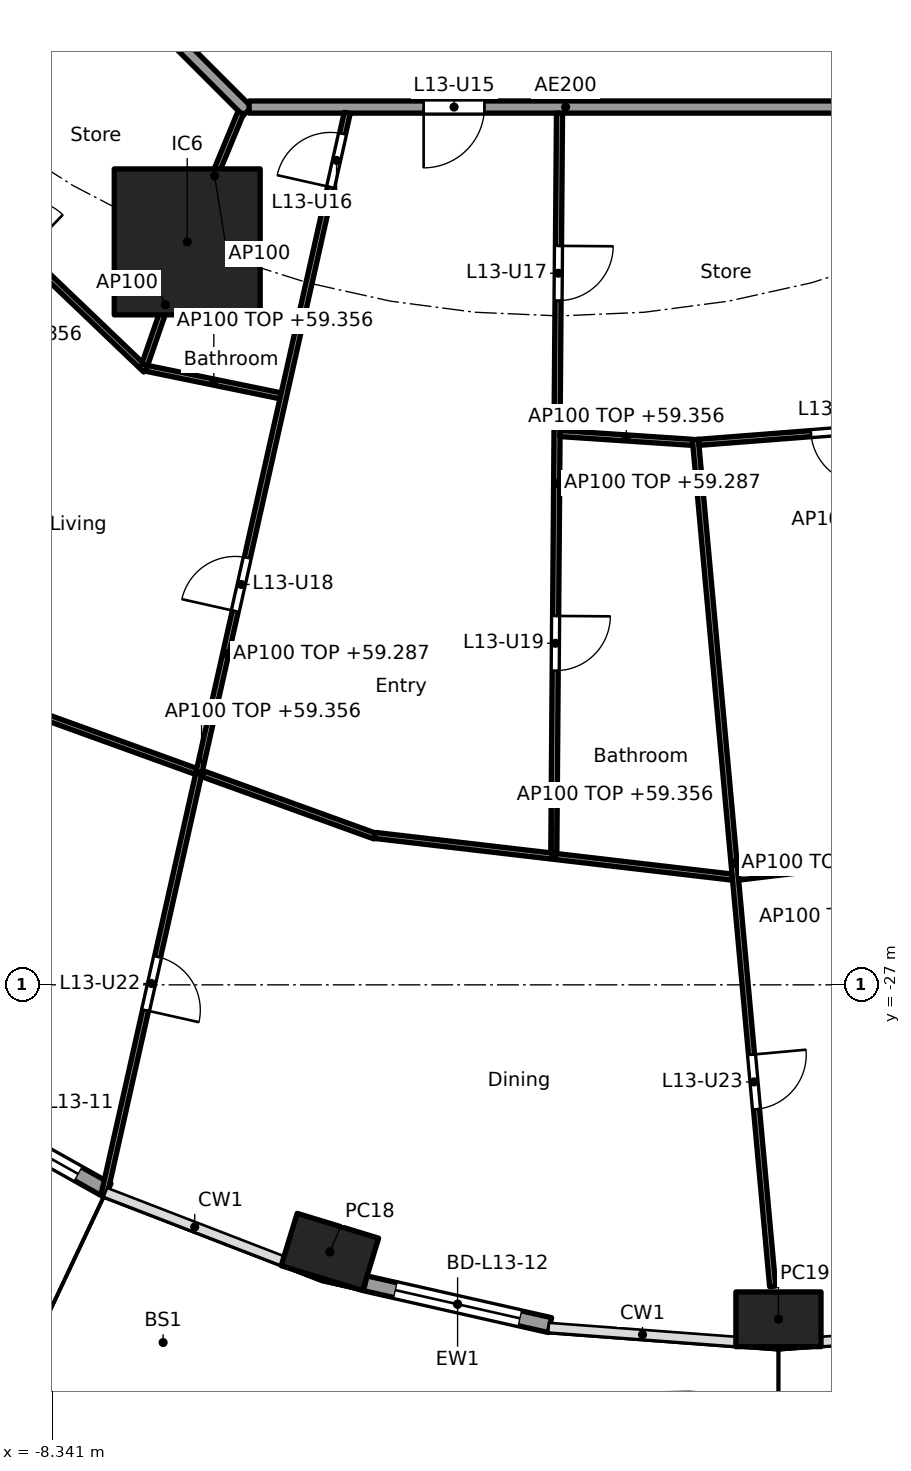
"""IFC4 building model, lengths in metres.
Left out: names, types, materials, properties, quantities, classifications, styles, units other than length and angle.
Written with IfcOpenShell. Run it as: python <this file> out.ifc"""

import sys

from ifc_helpers import new_model, si_unit, direction, frame, frame_2d, origin, origin_2d, place, context, subcontext, project, spatial, rectangle, hollow_rectangle, extrude, element, fill, save


model = new_model("IFC4")
c1 = context("Model", 3, precision=1e-05, world=origin(), true_north=direction((0.0, 1.0)))
c2 = subcontext(c1, "Body", "Model", "MODEL_VIEW")
j1 = project(units=[si_unit("LENGTHUNIT", "METRE"), si_unit("PLANEANGLEUNIT", "RADIAN")], contexts=[c1])
p1 = place(None, origin())
s1 = spatial("IfcSite", under=j1, at=p1, CompositionType="ELEMENT")
p2 = place(p1, origin())
s2 = spatial("IfcBuilding", under=s1, at=p2, CompositionType="ELEMENT")
p3 = place(p2, frame((0.0, 0.0, 56.6)))
s3 = spatial("IfcBuildingStorey", under=s2, at=p3, CompositionType="ELEMENT", Elevation=56.6)
for number, where, z_axis, x_axis in (
    (1, (-3.776, -31.393, 0.0), (0.0, 0.0, 1.0), (0.957, -0.292, 0.0)),
    (2, (3.6, -32.5, 0.0), (0.0, 0.0, 1.0), (1.0, 0.0, 0.0)),
):
    element("IfcColumn", number, at=place(p3, frame(where, z_axis=z_axis, x_axis=x_axis)), inside=s3, PredefinedType="COLUMN", context=c2, shape_type="SweptSolid", body=[
        extrude(hollow_rectangle(XDim=1.4, YDim=0.9, WallThickness=0.05, at=origin_2d()), origin(), (0.0, 0.0, 1.0), 3.7),
    ])
p4 = place(p3, frame((-6.123, -14.782, 0.0), z_axis=(0.0, 0.0, 1.0), x_axis=(1.0, 0.0, 0.0)))
e3 = element("IfcColumn", 3, at=p4, inside=s3, PredefinedType="COLUMN", context=c2, shape_type="SweptSolid", body=[
    extrude(rectangle(XDim=2.4, YDim=2.4, at=origin_2d()), origin(), (0.0, 0.0, 1.0), 3.7),
])
p5 = place(p3, frame((-7.437, -30.379, 0.0), z_axis=(0.0, 0.0, 1.0), x_axis=(-0.872084295691, 0.489355679653, 0.0)))
e4 = element("IfcWall", 4, at=p5, inside=s3, PredefinedType="SOLIDWALL", context=c2, shape_type="SweptSolid", body=[
    extrude(rectangle(XDim=3.201, YDim=0.25, at=frame_2d((1.601, 0.0))), origin(), (0.0, 0.0, 1.0), 3.44),
])
p6 = place(p5, frame((0.551, 0.0, 0.0)))
e5 = element("IfcOpeningElement", 5, at=p6, cuts=e4, PredefinedType="OPENING", context=c2, shape_type="SweptSolid", body=[
    extrude(rectangle(XDim=2.1, YDim=2.4, at=frame_2d((1.05, 1.2))), frame((0.0, 0.135, 0.0), z_axis=(0.0, -1.0, 0.0), x_axis=(1.0, 0.0, 0.0)), (0.0, 0.0, 1.0), 0.27),
])
p7 = place(p3, frame((-0.158, -32.596, 0.0), z_axis=(0.0, 0.0, 1.0), x_axis=(-0.975331134677, 0.220746863466, 0.0)))
e6 = element("IfcWall", 6, at=p7, inside=s3, PredefinedType="SOLIDWALL", context=c2, shape_type="SweptSolid", body=[
    extrude(rectangle(XDim=3.115, YDim=0.25, at=frame_2d((1.557, 0.0))), origin(), (0.0, 0.0, 1.0), 3.44),
])
p8 = place(p7, frame((0.507, 0.0, 0.0)))
e7 = element("IfcOpeningElement", 7, at=p8, cuts=e6, PredefinedType="OPENING", context=c2, shape_type="SweptSolid", body=[
    extrude(rectangle(XDim=2.1, YDim=2.4, at=frame_2d((1.05, 1.2))), frame((0.0, 0.135, 0.0), z_axis=(0.0, -1.0, 0.0), x_axis=(1.0, 0.0, 0.0)), (0.0, 0.0, 1.0), 0.27),
])
p9 = place(p3, frame((-12.635, -5.134, 0.0), z_axis=(0.0, 0.0, 1.0), x_axis=(0.707106781187, -0.707106781187, 0.0)))
e8 = element("IfcWall", 8, at=p9, inside=s3, PredefinedType="PARTITIONING", context=c2, shape_type="SweptSolid", body=[
    extrude(rectangle(XDim=10.609, YDim=0.2, at=frame_2d((5.305, 0.0))), origin(), (0.0, 0.0, 1.0), 3.44),
])
p10 = place(p3, frame((-5.104, -12.565, 0.0), z_axis=(0.0, 0.0, 1.0), x_axis=(1.0, 0.0, 0.0)))
e9 = element("IfcWall", 9, at=p10, inside=s3, PredefinedType="PARTITIONING", context=c2, shape_type="SweptSolid", body=[
    extrude(rectangle(XDim=10.409, YDim=0.2, at=frame_2d((5.205, 0.0))), origin(), (0.0, 0.0, 1.0), 3.44),
])
p11 = place(p10, frame((2.87, 0.0, 0.0)))
e10 = element("IfcOpeningElement", 10, at=p11, cuts=e9, PredefinedType="OPENING", context=c2, shape_type="SweptSolid", body=[
    extrude(rectangle(XDim=1.0, YDim=2.1, at=frame_2d((0.5, 1.05))), frame((0.0, 0.11, 0.0), z_axis=(0.0, -1.0, 0.0), x_axis=(1.0, 0.0, 0.0)), (0.0, 0.0, 1.0), 0.22),
])
p12 = place(p3, frame((-7.715, -10.193, 0.0), z_axis=(0.0, 0.0, 1.0), x_axis=(-0.573126502256, -0.819466907454, 0.0)))
e11 = element("IfcWall", 11, at=p12, inside=s3, PredefinedType="PARTITIONING", context=c2, shape_type="SweptSolid", body=[
    extrude(rectangle(XDim=9.954, YDim=0.1, at=frame_2d((4.977, 0.0))), origin(), (0.0, 0.0, 1.0), 2.687),
])
p13 = place(p3, frame((-10.119, -13.716, 0.0), z_axis=(0.0, 0.0, 1.0), x_axis=(0.722763212502, -0.69109575216, 0.0)))
e12 = element("IfcWall", 12, at=p13, inside=s3, PredefinedType="PARTITIONING", context=c2, shape_type="SweptSolid", body=[
    extrude(rectangle(XDim=4.587, YDim=0.1, at=frame_2d((2.293, 0.0))), origin(), (0.0, 0.0, 1.0), 2.756),
])
p14 = place(p13, frame((0.938, 0.0, 0.0)))
e13 = element("IfcOpeningElement", 13, at=p14, cuts=e12, PredefinedType="OPENING", context=c2, shape_type="SweptSolid", body=[
    extrude(rectangle(XDim=0.9, YDim=2.1, at=frame_2d((0.45, 1.05))), frame((0.0, 0.06, 0.0), z_axis=(0.0, -1.0, 0.0), x_axis=(1.0, 0.0, 0.0)), (0.0, 0.0, 1.0), 0.12),
])
p15 = place(p3, frame((-5.243, -12.657, 0.0), z_axis=(0.0, 0.0, 1.0), x_axis=(-0.382719158442, -0.923864733477, 0.0)))
e14 = element("IfcWall", 14, at=p15, inside=s3, PredefinedType="PARTITIONING", context=c2, shape_type="SweptSolid", body=[
    extrude(rectangle(XDim=2.25, YDim=0.1, at=frame_2d((1.125, 0.0))), origin(), (0.0, 0.0, 1.0), 3.44),
])
p16 = place(p3, frame((-6.139, -14.83, 0.0), z_axis=(0.0, 0.0, 1.0), x_axis=(-0.327246993321, -0.944938836837, 0.0)))
e15 = element("IfcWall", 15, at=p16, inside=s3, PredefinedType="PARTITIONING", context=c2, shape_type="SweptSolid", body=[
    extrude(rectangle(XDim=2.09, YDim=0.1, at=frame_2d((1.045, 0.0))), origin(), (0.0, 0.0, 1.0), 3.44),
])
p17 = place(p3, frame((-6.791, -16.862, 0.0), z_axis=(0.0, 0.0, 1.0), x_axis=(0.979581941859, -0.201045316246, 0.0)))
e16 = element("IfcWall", 16, at=p17, inside=s3, PredefinedType="PARTITIONING", context=c2, shape_type="SweptSolid", body=[
    extrude(rectangle(XDim=2.256, YDim=0.1, at=frame_2d((1.128, 0.0))), origin(), (0.0, 0.0, 1.0), 2.756),
])
p18 = place(p3, frame((-8.739, -22.491, 0.0), z_axis=(0.0, 0.0, 1.0), x_axis=(0.940401691072, -0.340065669288, 0.0)))
e17 = element("IfcWall", 17, at=p18, inside=s3, PredefinedType="PARTITIONING", context=c2, shape_type="SweptSolid", body=[
    extrude(rectangle(XDim=6.067, YDim=0.1, at=frame_2d((3.034, 0.0))), origin(), (0.0, 0.0, 1.0), 2.756),
])
p19 = place(p3, frame((-3.492, -12.662, 0.0), z_axis=(0.0, 0.0, 1.0), x_axis=(-0.219268088006, -0.975664648115, 0.0)))
e18 = element("IfcWall", 18, at=p19, inside=s3, PredefinedType="PARTITIONING", context=c2, shape_type="SweptSolid", body=[
    extrude(rectangle(XDim=18.23, YDim=0.1, at=frame_2d((9.115, 0.0))), origin(), (0.0, 0.0, 1.0), 2.687),
])
p20 = place(p19, frame((0.35, 0.0, 0.0)))
e19 = element("IfcOpeningElement", 19, at=p20, cuts=e18, PredefinedType="OPENING", context=c2, shape_type="SweptSolid", body=[
    extrude(rectangle(XDim=0.9, YDim=2.1, at=frame_2d((0.45, 1.05))), frame((0.0, 0.06, 0.0), z_axis=(0.0, -1.0, 0.0), x_axis=(1.0, 0.0, 0.0)), (0.0, 0.0, 1.0), 0.12),
])
p21 = place(p19, frame((7.497, 0.0, 0.0)))
e20 = element("IfcOpeningElement", 20, at=p21, cuts=e18, PredefinedType="OPENING", context=c2, shape_type="SweptSolid", body=[
    extrude(rectangle(XDim=0.9, YDim=2.1, at=frame_2d((0.45, 1.05))), frame((0.0, 0.06, 0.0), z_axis=(0.0, -1.0, 0.0), x_axis=(1.0, 0.0, 0.0)), (0.0, 0.0, 1.0), 0.12),
])
p22 = place(p19, frame((14.223, 0.0, 0.0)))
e21 = element("IfcOpeningElement", 21, at=p22, cuts=e18, PredefinedType="OPENING", context=c2, shape_type="SweptSolid", body=[
    extrude(rectangle(XDim=0.9, YDim=2.1, at=frame_2d((0.45, 1.05))), frame((0.0, 0.06, 0.0), z_axis=(0.0, -1.0, 0.0), x_axis=(1.0, 0.0, 0.0)), (0.0, 0.0, 1.0), 0.12),
])
p23 = place(p3, frame((-3.031, -24.543, 0.0), z_axis=(0.0, 0.0, 1.0), x_axis=(0.993255612046, -0.115945198862, 0.0)))
e22 = element("IfcWall", 22, at=p23, inside=s3, PredefinedType="PARTITIONING", context=c2, shape_type="SweptSolid", body=[
    extrude(rectangle(XDim=5.913, YDim=0.1, at=frame_2d((2.956, 0.0))), origin(), (0.0, 0.0, 1.0), 2.756),
])
p24 = place(p3, frame((-0.001, -12.665, 0.0), z_axis=(0.0, 0.0, 1.0), x_axis=(-0.007702417287, -0.999970335944, 0.0)))
e23 = element("IfcWall", 23, at=p24, inside=s3, PredefinedType="PARTITIONING", context=c2, shape_type="SweptSolid", body=[
    extrude(rectangle(XDim=12.171, YDim=0.1, at=frame_2d((6.086, 0.0))), origin(), (0.0, 0.0, 1.0), 2.687),
])
p25 = place(p24, frame((2.183, 0.0, 0.0)))
e24 = element("IfcOpeningElement", 24, at=p25, cuts=e23, PredefinedType="OPENING", context=c2, shape_type="SweptSolid", body=[
    extrude(rectangle(XDim=0.9, YDim=2.1, at=frame_2d((0.45, 1.05))), frame((0.0, 0.06, 0.0), z_axis=(0.0, -1.0, 0.0), x_axis=(1.0, 0.0, 0.0)), (0.0, 0.0, 1.0), 0.12),
])
p26 = place(p24, frame((8.269, 0.0, 0.0)))
e25 = element("IfcOpeningElement", 25, at=p26, cuts=e23, PredefinedType="OPENING", context=c2, shape_type="SweptSolid", body=[
    extrude(rectangle(XDim=0.9, YDim=2.1, at=frame_2d((0.45, 1.05))), frame((0.0, 0.06, 0.0), z_axis=(0.0, -1.0, 0.0), x_axis=(1.0, 0.0, 0.0)), (0.0, 0.0, 1.0), 0.12),
])
p27 = place(p3, frame((0.009, -17.934, 0.0), z_axis=(0.0, 0.0, 1.0), x_axis=(0.997794542617, -0.066378089183, 0.0)))
e26 = element("IfcWall", 26, at=p27, inside=s3, PredefinedType="PARTITIONING", context=c2, shape_type="SweptSolid", body=[
    extrude(rectangle(XDim=2.185, YDim=0.1, at=frame_2d((1.092, 0.0))), origin(), (0.0, 0.0, 1.0), 2.756),
])
p28 = place(p3, frame((2.234, -18.032, 0.0), z_axis=(0.0, 0.0, 1.0), x_axis=(0.090891502968, -0.995860800859, 0.0)))
e27 = element("IfcWall", 27, at=p28, inside=s3, PredefinedType="PARTITIONING", context=c2, shape_type="SweptSolid", body=[
    extrude(rectangle(XDim=13.984, YDim=0.1, at=frame_2d((6.992, 0.0))), origin(), (0.0, 0.0, 1.0), 2.756),
])
p29 = place(p28, frame((10.158, 0.0, 0.0)))
e28 = element("IfcOpeningElement", 28, at=p29, cuts=e27, PredefinedType="OPENING", context=c2, shape_type="SweptSolid", body=[
    extrude(rectangle(XDim=0.9, YDim=2.1, at=frame_2d((0.45, 1.05))), frame((0.0, 0.06, 0.0), z_axis=(0.0, -1.0, 0.0), x_axis=(1.0, 0.0, 0.0)), (0.0, 0.0, 1.0), 0.12),
])
p30 = place(p3, frame((2.288, -18.078, 0.0), z_axis=(0.0, 0.0, 1.0), x_axis=(0.99701850123, 0.077162868047, 0.0)))
e29 = element("IfcWall", 29, at=p30, inside=s3, PredefinedType="PARTITIONING", context=c2, shape_type="SweptSolid", body=[
    extrude(rectangle(XDim=4.604, YDim=0.1, at=frame_2d((2.302, 0.0))), origin(), (0.0, 0.0, 1.0), 2.756),
])
p31 = place(p30, frame((1.852, 0.0, 0.0)))
e30 = element("IfcOpeningElement", 30, at=p31, cuts=e29, PredefinedType="OPENING", context=c2, shape_type="SweptSolid", body=[
    extrude(rectangle(XDim=0.9, YDim=2.1, at=frame_2d((0.45, 1.05))), frame((0.0, 0.06, 0.0), z_axis=(0.0, -1.0, 0.0), x_axis=(1.0, 0.0, 0.0)), (0.0, 0.0, 1.0), 0.12),
])
p32 = place(p3, frame((2.941, -25.229, 0.0), z_axis=(0.0, 0.0, 1.0), x_axis=(0.992834127896, 0.119500604542, 0.0)))
e31 = element("IfcWall", 31, at=p32, inside=s3, PredefinedType="PARTITIONING", context=c2, shape_type="SweptSolid", body=[
    extrude(rectangle(XDim=5.959, YDim=0.1, at=frame_2d((2.98, 0.0))), origin(), (0.0, 0.0, 1.0), 2.756),
])
p33 = place(p6, origin())
e32 = element("IfcDoor", 32, at=p33, inside=s3, OperationType="SLIDING_TO_LEFT", PredefinedType="DOOR", context=c2, shape_type="SweptSolid", body=[
    extrude(rectangle(XDim=2.1, YDim=2.4, at=frame_2d((1.05, 1.2))), frame((0.0, 0.025, 0.0), z_axis=(0.0, -1.0, 0.0), x_axis=(1.0, 0.0, 0.0)), (0.0, 0.0, 1.0), 0.05),
])
fill(e5, e32)
p34 = place(p8, origin())
e33 = element("IfcDoor", 33, at=p34, inside=s3, OperationType="SLIDING_TO_LEFT", PredefinedType="DOOR", context=c2, shape_type="SweptSolid", body=[
    extrude(rectangle(XDim=2.1, YDim=2.4, at=frame_2d((1.05, 1.2))), frame((0.0, 0.025, 0.0), z_axis=(0.0, -1.0, 0.0), x_axis=(1.0, 0.0, 0.0)), (0.0, 0.0, 1.0), 0.05),
])
fill(e7, e33)
p35 = place(p11, frame((1.0, 0.0, 0.0), x_axis=(-1.0, 0.0, 0.0)))
e34 = element("IfcDoor", 34, at=p35, inside=s3, OperationType="SINGLE_SWING_RIGHT", PredefinedType="DOOR", context=c2, shape_type="SweptSolid", body=[
    extrude(rectangle(XDim=1.0, YDim=2.1, at=frame_2d((0.5, 1.05))), frame((0.0, 0.025, 0.0), z_axis=(0.0, -1.0, 0.0), x_axis=(1.0, 0.0, 0.0)), (0.0, 0.0, 1.0), 0.05),
])
fill(e10, e34)
p36 = place(p20, frame((0.9, 0.0, 0.0), x_axis=(-1.0, 0.0, 0.0)))
e35 = element("IfcDoor", 35, at=p36, inside=s3, OperationType="SINGLE_SWING_LEFT", PredefinedType="DOOR", context=c2, shape_type="SweptSolid", body=[
    extrude(rectangle(XDim=0.9, YDim=2.1, at=frame_2d((0.45, 1.05))), frame((0.0, 0.025, 0.0), z_axis=(0.0, -1.0, 0.0), x_axis=(1.0, 0.0, 0.0)), (0.0, 0.0, 1.0), 0.05),
])
fill(e19, e35)
p37 = place(p25, origin())
e36 = element("IfcDoor", 36, at=p37, inside=s3, OperationType="SINGLE_SWING_LEFT", PredefinedType="DOOR", context=c2, shape_type="SweptSolid", body=[
    extrude(rectangle(XDim=0.9, YDim=2.1, at=frame_2d((0.45, 1.05))), frame((0.0, 0.025, 0.0), z_axis=(0.0, -1.0, 0.0), x_axis=(1.0, 0.0, 0.0)), (0.0, 0.0, 1.0), 0.05),
])
fill(e24, e36)
p38 = place(p21, frame((0.9, 0.0, 0.0), x_axis=(-1.0, 0.0, 0.0)))
e37 = element("IfcDoor", 37, at=p38, inside=s3, OperationType="SINGLE_SWING_LEFT", PredefinedType="DOOR", context=c2, shape_type="SweptSolid", body=[
    extrude(rectangle(XDim=0.9, YDim=2.1, at=frame_2d((0.45, 1.05))), frame((0.0, 0.025, 0.0), z_axis=(0.0, -1.0, 0.0), x_axis=(1.0, 0.0, 0.0)), (0.0, 0.0, 1.0), 0.05),
])
fill(e20, e37)
p39 = place(p26, origin())
e38 = element("IfcDoor", 38, at=p39, inside=s3, OperationType="SINGLE_SWING_LEFT", PredefinedType="DOOR", context=c2, shape_type="SweptSolid", body=[
    extrude(rectangle(XDim=0.9, YDim=2.1, at=frame_2d((0.45, 1.05))), frame((0.0, 0.025, 0.0), z_axis=(0.0, -1.0, 0.0), x_axis=(1.0, 0.0, 0.0)), (0.0, 0.0, 1.0), 0.05),
])
fill(e25, e38)
p40 = place(p31, frame((0.9, 0.0, 0.0), x_axis=(-1.0, 0.0, 0.0)))
e39 = element("IfcDoor", 39, at=p40, inside=s3, OperationType="SINGLE_SWING_LEFT", PredefinedType="DOOR", context=c2, shape_type="SweptSolid", body=[
    extrude(rectangle(XDim=0.9, YDim=2.1, at=frame_2d((0.45, 1.05))), frame((0.0, 0.025, 0.0), z_axis=(0.0, -1.0, 0.0), x_axis=(1.0, 0.0, 0.0)), (0.0, 0.0, 1.0), 0.05),
])
fill(e30, e39)
p41 = place(p22, origin())
e40 = element("IfcDoor", 40, at=p41, inside=s3, OperationType="SINGLE_SWING_RIGHT", PredefinedType="DOOR", context=c2, shape_type="SweptSolid", body=[
    extrude(rectangle(XDim=0.9, YDim=2.1, at=frame_2d((0.45, 1.05))), frame((0.0, 0.025, 0.0), z_axis=(0.0, -1.0, 0.0), x_axis=(1.0, 0.0, 0.0)), (0.0, 0.0, 1.0), 0.05),
])
fill(e21, e40)
p42 = place(p29, origin())
e41 = element("IfcDoor", 41, at=p42, inside=s3, OperationType="SINGLE_SWING_LEFT", PredefinedType="DOOR", context=c2, shape_type="SweptSolid", body=[
    extrude(rectangle(XDim=0.9, YDim=2.1, at=frame_2d((0.45, 1.05))), frame((0.0, 0.025, 0.0), z_axis=(0.0, -1.0, 0.0), x_axis=(1.0, 0.0, 0.0)), (0.0, 0.0, 1.0), 0.05),
])
fill(e28, e41)
save(model, sys.argv[1])
